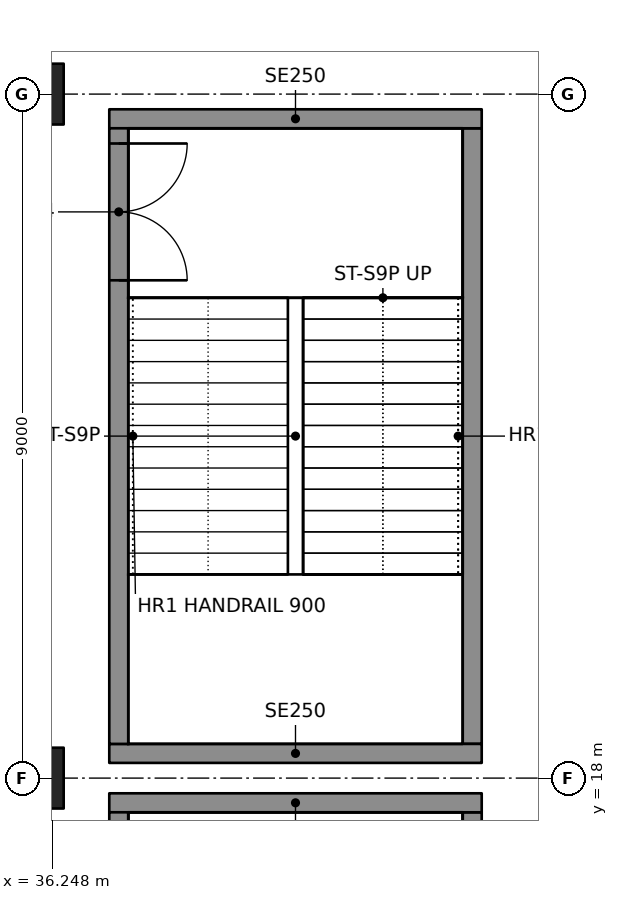
"""IFC4 building model, lengths in metres.
Left out: names, types, materials, properties, quantities, classifications, styles, units other than length and angle.
Written with IfcOpenShell. Run it as: python <this file> out.ifc"""

import sys

from ifc_helpers import new_model, si_unit, direction, frame, frame_2d, origin, origin_2d, place, context, subcontext, project, spatial, rectangle, hollow_rectangle, extrude, element, fill, save


model = new_model("IFC4")
c1 = context("Model", 3, precision=1e-05, world=origin(), true_north=direction((0.0, 1.0)))
c2 = subcontext(c1, "Body", "Model", "MODEL_VIEW")
j1 = project(units=[si_unit("LENGTHUNIT", "METRE"), si_unit("PLANEANGLEUNIT", "RADIAN")], contexts=[c1])
p1 = place(None, origin())
s1 = spatial("IfcSite", under=j1, at=p1, CompositionType="ELEMENT")
p2 = place(p1, origin())
s2 = spatial("IfcBuilding", under=s1, at=p2, CompositionType="ELEMENT")
p3 = place(p2, frame((0.0, 0.0, 6.0)))
s3 = spatial("IfcBuildingStorey", under=s2, at=p3, CompositionType="ELEMENT", Elevation=6.0)
for number, where, z_axis, x_axis in (
    (1, (36.0, 18.0, 0.0), (0.0, 0.0, 1.0), (0.0, 1.0, 0.0)),
    (2, (36.0, 27.0, 0.0), (0.0, 0.0, 1.0), (1.0, 0.0, 0.0)),
):
    element("IfcColumn", number, at=place(p3, frame(where, z_axis=z_axis, x_axis=x_axis)), inside=s3, PredefinedType="COLUMN", context=c2, shape_type="SweptSolid", body=[
        extrude(hollow_rectangle(XDim=0.8, YDim=0.8, WallThickness=0.1, at=origin_2d()), origin(), (0.0, 0.0, 1.0), 5.0),
    ])
p4 = place(p3, frame((37.0, 17.675, 0.0), z_axis=(0.0, 0.0, 1.0), x_axis=(1.0, 0.0, 0.0)))
e3 = element("IfcWall", 3, at=p4, inside=s3, PredefinedType="SOLIDWALL", context=c2, shape_type="SweptSolid", body=[
    extrude(rectangle(XDim=4.9, YDim=0.25, at=frame_2d((2.45, 0.0))), origin(), (0.0, 0.0, 1.0), 4.75),
])
p5 = place(p3, frame((37.125, 9.45, 0.0), z_axis=(0.0, 0.0, 1.0), x_axis=(0.0, 1.0, 0.0)))
e4 = element("IfcWall", 4, at=p5, inside=s3, PredefinedType="SOLIDWALL", context=c2, shape_type="SweptSolid", body=[
    extrude(rectangle(XDim=8.1, YDim=0.25, at=frame_2d((4.05, 0.0))), origin(), (0.0, 0.0, 1.0), 4.75),
])
p6 = place(p5, frame((6.1, 0.0, 0.0)))
e5 = element("IfcOpeningElement", 5, at=p6, cuts=e4, PredefinedType="OPENING", context=c2, shape_type="SweptSolid", body=[
    extrude(rectangle(XDim=1.8, YDim=2.1, at=frame_2d((0.9, 1.05))), frame((0.0, 0.135, 0.0), z_axis=(0.0, -1.0, 0.0), x_axis=(1.0, 0.0, 0.0)), (0.0, 0.0, 1.0), 0.27),
])
p7 = place(p3, frame((41.775, 9.45, 0.0), z_axis=(0.0, 0.0, 1.0), x_axis=(0.0, 1.0, 0.0)))
e6 = element("IfcWall", 6, at=p7, inside=s3, PredefinedType="SOLIDWALL", context=c2, shape_type="SweptSolid", body=[
    extrude(rectangle(XDim=8.1, YDim=0.25, at=frame_2d((4.05, 0.0))), origin(), (0.0, 0.0, 1.0), 4.75),
])
for number, where, z_axis, x_axis in (
    (7, (37.0, 18.325, 0.0), (0.0, 0.0, 1.0), (1.0, 0.0, 0.0)),
    (8, (37.0, 26.675, 0.0), (0.0, 0.0, 1.0), (1.0, 0.0, 0.0)),
):
    element("IfcWall", number, at=place(p3, frame(where, z_axis=z_axis, x_axis=x_axis)), inside=s3, PredefinedType="SOLIDWALL", context=c2, shape_type="SweptSolid", body=[
        extrude(rectangle(XDim=4.9, YDim=0.25, at=frame_2d((2.45, 0.0))), origin(), (0.0, 0.0, 1.0), 4.75),
    ])
p8 = place(p3, frame((37.125, 18.45, 0.0), z_axis=(0.0, 0.0, 1.0), x_axis=(0.0, 1.0, 0.0)))
e9 = element("IfcWall", 9, at=p8, inside=s3, PredefinedType="SOLIDWALL", context=c2, shape_type="SweptSolid", body=[
    extrude(rectangle(XDim=8.1, YDim=0.25, at=frame_2d((4.05, 0.0))), origin(), (0.0, 0.0, 1.0), 4.75),
])
p9 = place(p8, frame((6.1, 0.0, 0.0)))
e10 = element("IfcOpeningElement", 10, at=p9, cuts=e9, PredefinedType="OPENING", context=c2, shape_type="SweptSolid", body=[
    extrude(rectangle(XDim=1.8, YDim=2.1, at=frame_2d((0.9, 1.05))), frame((0.0, 0.135, 0.0), z_axis=(0.0, -1.0, 0.0), x_axis=(1.0, 0.0, 0.0)), (0.0, 0.0, 1.0), 0.27),
])
p10 = place(p3, frame((41.775, 18.45, 0.0), z_axis=(0.0, 0.0, 1.0), x_axis=(0.0, 1.0, 0.0)))
e11 = element("IfcWall", 11, at=p10, inside=s3, PredefinedType="SOLIDWALL", context=c2, shape_type="SweptSolid", body=[
    extrude(rectangle(XDim=8.1, YDim=0.25, at=frame_2d((4.05, 0.0))), origin(), (0.0, 0.0, 1.0), 4.75),
])
p11 = place(p9, frame((1.8, 0.0, 0.0), z_axis=(0.0, 0.0, 1.0), x_axis=(-1.0, 0.0, 0.0)))
e12 = element("IfcDoor", 12, at=p11, inside=s3, OperationType="DOUBLE_DOOR_SINGLE_SWING", PredefinedType="DOOR", context=c2, shape_type="SweptSolid", body=[
    extrude(rectangle(XDim=1.8, YDim=2.1, at=frame_2d((0.9, 1.05))), frame((0.0, 0.025, 0.0), z_axis=(0.0, -1.0, 0.0), x_axis=(1.0, 0.0, 0.0)), (0.0, 0.0, 1.0), 0.05),
])
fill(e10, e12)
save(model, sys.argv[1])
